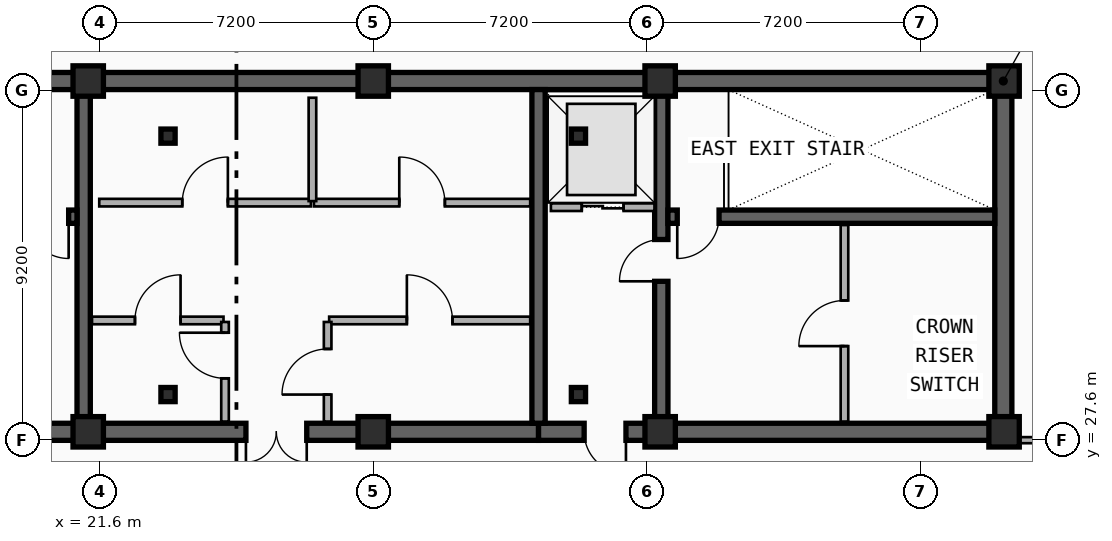
"""IFC4 building model, lengths in metres.
Left out: names, types, materials, properties, quantities, classifications, styles, units other than length and angle.
Written with IfcOpenShell. Run it as: python <this file> out.ifc"""

import sys

from ifc_helpers import new_model, si_unit, direction, frame, frame_2d, origin, origin_2d, place, context, subcontext, project, spatial, rectangle, i_section, extrude, element, fill, save


model = new_model("IFC4")
c1 = context("Model", 3, precision=1e-05, world=origin(), true_north=direction((0.0, 1.0)))
c2 = subcontext(c1, "Body", "Model", "MODEL_VIEW")
j1 = project(units=[si_unit("LENGTHUNIT", "METRE"), si_unit("PLANEANGLEUNIT", "RADIAN")], contexts=[c1])
p1 = place(None, origin())
s1 = spatial("IfcSite", under=j1, at=p1, CompositionType="ELEMENT")
p2 = place(p1, origin())
s2 = spatial("IfcBuilding", under=s1, at=p2, CompositionType="ELEMENT")
p3 = place(p2, frame((0.0, 0.0, 286.6)))
s3 = spatial("IfcBuildingStorey", under=s2, at=p3, CompositionType="ELEMENT", Elevation=286.6)
p4 = place(p3, frame((12.15, 37.05, 0.0), z_axis=(0.0, 0.0, 1.0), x_axis=(1.0, 0.0, 0.0)))
e1 = element("IfcWall", 1, at=p4, inside=s3, PredefinedType="SHEAR", context=c2, shape_type="SweptSolid", body=[
    extrude(rectangle(XDim=33.23, YDim=0.45, at=frame_2d((16.615, 0.0))), origin(), (0.0, 0.0, 1.0), 5.0),
])
p5 = place(p3, frame((21.18, 27.82, 0.0), z_axis=(0.0, 0.0, 1.0), x_axis=(-1.0, 0.0, 0.0)))
e2 = element("IfcWall", 2, at=p5, inside=s3, PredefinedType="SHEAR", context=c2, shape_type="SweptSolid", body=[
    extrude(rectangle(XDim=9.03, YDim=0.45, at=frame_2d((4.515, 0.0))), origin(), (0.0, 0.0, 1.0), 5.0),
])
p6 = place(p5, frame((2.68, 0.0, 0.0)))
e3 = element("IfcOpeningElement", 3, at=p6, cuts=e2, PredefinedType="OPENING", context=c2, shape_type="SweptSolid", body=[
    extrude(rectangle(XDim=1.1, YDim=2.15, at=frame_2d((0.55, 1.075))), frame((0.0, 0.235, 0.0), z_axis=(0.0, -1.0, 0.0), x_axis=(1.0, 0.0, 0.0)), (0.0, 0.0, 1.0), 0.47),
])
p7 = place(p3, frame((33.15, 27.82, 0.0), z_axis=(0.0, 0.0, 1.0), x_axis=(-1.0, 0.0, 0.0)))
e4 = element("IfcWall", 4, at=p7, inside=s3, PredefinedType="SHEAR", context=c2, shape_type="SweptSolid", body=[
    extrude(rectangle(XDim=11.97, YDim=0.45, at=frame_2d((5.985, 0.0))), origin(), (0.0, 0.0, 1.0), 5.0),
])
p8 = place(p7, frame((6.1, 0.0, 0.0)))
e5 = element("IfcOpeningElement", 5, at=p8, cuts=e4, PredefinedType="OPENING", context=c2, shape_type="SweptSolid", body=[
    extrude(rectangle(XDim=1.6, YDim=2.2, at=frame_2d((0.8, 1.1))), frame((0.0, 0.235, 0.0), z_axis=(0.0, -1.0, 0.0), x_axis=(1.0, 0.0, 0.0)), (0.0, 0.0, 1.0), 0.47),
])
p9 = place(p3, frame((45.38, 27.82, 0.0), z_axis=(0.0, 0.0, 1.0), x_axis=(-1.0, 0.0, 0.0)))
e6 = element("IfcWall", 6, at=p9, inside=s3, PredefinedType="SHEAR", context=c2, shape_type="SweptSolid", body=[
    extrude(rectangle(XDim=12.23, YDim=0.45, at=frame_2d((6.115, 0.0))), origin(), (0.0, 0.0, 1.0), 5.0),
])
p10 = place(p9, frame((9.93, 0.0, 0.0)))
e7 = element("IfcOpeningElement", 7, at=p10, cuts=e6, PredefinedType="OPENING", context=c2, shape_type="SweptSolid", body=[
    extrude(rectangle(XDim=1.1, YDim=2.15, at=frame_2d((0.55, 1.075))), frame((0.0, 0.235, 0.0), z_axis=(0.0, -1.0, 0.0), x_axis=(1.0, 0.0, 0.0)), (0.0, 0.0, 1.0), 0.47),
])
p11 = place(p3, frame((45.38, 28.045, 0.0), z_axis=(0.0, 0.0, 1.0), x_axis=(0.0, 1.0, 0.0)))
e8 = element("IfcWall", 8, at=p11, inside=s3, PredefinedType="SHEAR", context=c2, shape_type="SweptSolid", body=[
    extrude(rectangle(XDim=8.78, YDim=0.45, at=frame_2d((4.39, 0.0))), origin(), (0.0, 0.0, 1.0), 5.0),
])
for number, where, z_axis, x_axis in (
    (9, (21.18, 28.045, 0.0), (0.0, 0.0, 1.0), (0.0, 1.0, 0.0)),
    (10, (33.15, 28.045, 0.0), (0.0, 0.0, 1.0), (0.0, 1.0, 0.0)),
):
    element("IfcWall", number, at=place(p3, frame(where, z_axis=z_axis, x_axis=x_axis)), inside=s3, PredefinedType="SHEAR", context=c2, shape_type="SweptSolid", body=[
        extrude(rectangle(XDim=8.78, YDim=0.35, at=frame_2d((4.39, 0.0))), origin(), (0.0, 0.0, 1.0), 5.0),
    ])
p12 = place(p3, frame((36.38, 28.045, 0.0), z_axis=(0.0, 0.0, 1.0), x_axis=(0.0, 1.0, 0.0)))
e11 = element("IfcWall", 11, at=p12, inside=s3, PredefinedType="SHEAR", context=c2, shape_type="SweptSolid", body=[
    extrude(rectangle(XDim=8.78, YDim=0.35, at=frame_2d((4.39, 0.0))), origin(), (0.0, 0.0, 1.0), 5.0),
])
p13 = place(p12, frame((3.735, 0.0, 0.0)))
e12 = element("IfcOpeningElement", 12, at=p13, cuts=e11, PredefinedType="OPENING", context=c2, shape_type="SweptSolid", body=[
    extrude(rectangle(XDim=1.1, YDim=2.15, at=frame_2d((0.55, 1.075))), frame((0.0, 0.185, 0.0), z_axis=(0.0, -1.0, 0.0), x_axis=(1.0, 0.0, 0.0)), (0.0, 0.0, 1.0), 0.37),
])
p14 = place(p3, frame((21.005, 33.48, 0.0), z_axis=(0.0, 0.0, 1.0), x_axis=(-1.0, 0.0, 0.0)))
e13 = element("IfcWall", 13, at=p14, inside=s3, PredefinedType="SHEAR", context=c2, shape_type="SweptSolid", body=[
    extrude(rectangle(XDim=8.63, YDim=0.35, at=frame_2d((4.315, 0.0))), origin(), (0.0, 0.0, 1.0), 5.0),
])
p15 = place(p14, frame((0.22, 0.0, 0.0)))
e14 = element("IfcOpeningElement", 14, at=p15, cuts=e13, PredefinedType="OPENING", context=c2, shape_type="SweptSolid", body=[
    extrude(rectangle(XDim=1.1, YDim=2.15, at=frame_2d((0.55, 1.075))), frame((0.0, 0.185, 0.0), z_axis=(0.0, -1.0, 0.0), x_axis=(1.0, 0.0, 0.0)), (0.0, 0.0, 1.0), 0.37),
])
p16 = place(p3, frame((45.155, 33.48, 0.0), z_axis=(0.0, 0.0, 1.0), x_axis=(-1.0, 0.0, 0.0)))
e15 = element("IfcWall", 15, at=p16, inside=s3, PredefinedType="SHEAR", context=c2, shape_type="SweptSolid", body=[
    extrude(rectangle(XDim=8.6, YDim=0.35, at=frame_2d((4.3, 0.0))), origin(), (0.0, 0.0, 1.0), 5.0),
])
p17 = place(p16, frame((7.255, 0.0, 0.0)))
e16 = element("IfcOpeningElement", 16, at=p17, cuts=e15, PredefinedType="OPENING", context=c2, shape_type="SweptSolid", body=[
    extrude(rectangle(XDim=1.1, YDim=2.15, at=frame_2d((0.55, 1.075))), frame((0.0, 0.185, 0.0), z_axis=(0.0, -1.0, 0.0), x_axis=(1.0, 0.0, 0.0)), (0.0, 0.0, 1.0), 0.37),
])
for number, where, z_axis, x_axis in (
    (17, (23.4, 28.8, 0.0), (0.0, 0.0, 1.0), (1.0, 0.0, 0.0)),
    (18, (34.2, 28.8, 0.0), (0.0, 0.0, 1.0), (1.0, 0.0, 0.0)),
    (19, (34.2, 35.6, 0.0), (0.0, 0.0, 1.0), (1.0, 0.0, 0.0)),
    (20, (23.4, 35.6, 0.0), (0.0, 0.0, 1.0), (1.0, 0.0, 0.0)),
):
    element("IfcColumn", number, at=place(p3, frame(where, z_axis=z_axis, x_axis=x_axis)), inside=s3, PredefinedType="COLUMN", context=c2, shape_type="SweptSolid", body=[
        extrude(i_section(OverallWidth=0.374, OverallDepth=0.372, WebThickness=0.017, FlangeThickness=0.027, FilletRadius=0.015, at=origin_2d()), origin(), (0.0, 0.0, 1.0), 5.0),
    ])
for number, where, z_axis, x_axis in (
    (21, (21.3, 27.82, 0.0), (0.0, 0.0, 1.0), (1.0, 0.0, 0.0)),
    (22, (21.3, 37.05, 0.0), (0.0, 0.0, 1.0), (1.0, 0.0, 0.0)),
    (23, (28.8, 27.82, 0.0), (0.0, 0.0, 1.0), (1.0, 0.0, 0.0)),
    (24, (28.8, 37.05, 0.0), (0.0, 0.0, 1.0), (1.0, 0.0, 0.0)),
    (25, (36.35, 27.82, 0.0), (0.0, 0.0, 1.0), (1.0, 0.0, 0.0)),
    (26, (36.35, 37.05, 0.0), (0.0, 0.0, 1.0), (1.0, 0.0, 0.0)),
    (27, (45.4, 27.82, 0.0), (0.0, 0.0, 1.0), (1.0, 0.0, 0.0)),
    (28, (45.4, 37.05, 0.0), (0.0, 0.0, 1.0), (1.0, 0.0, 0.0)),
):
    element("IfcColumn", number, at=place(p3, frame(where, z_axis=z_axis, x_axis=x_axis)), inside=s3, PredefinedType="COLUMN", context=c2, shape_type="SweptSolid", body=[
        extrude(rectangle(XDim=0.8, YDim=0.8, at=origin_2d()), origin(), (0.0, 0.0, 1.0), 5.0),
    ])
p18 = place(p3, frame((33.475, 33.73, 0.0), z_axis=(0.0, 0.0, 1.0), x_axis=(1.0, 0.0, 0.0)))
e29 = element("IfcWall", 29, at=p18, inside=s3, PredefinedType="PARTITIONING", context=c2, shape_type="SweptSolid", body=[
    extrude(rectangle(XDim=2.725, YDim=0.2, at=frame_2d((1.362, 0.0))), origin(), (0.0, 0.0, 1.0), 3.77),
])
p19 = place(p18, frame((0.812, 0.0, 0.0)))
e30 = element("IfcOpeningElement", 30, at=p19, cuts=e29, PredefinedType="OPENING", context=c2, shape_type="SweptSolid", body=[
    extrude(rectangle(XDim=1.1, YDim=2.15, at=frame_2d((0.55, 1.075))), frame((0.0, 0.11, 0.0), z_axis=(0.0, -1.0, 0.0), x_axis=(1.0, 0.0, 0.0)), (0.0, 0.0, 1.0), 0.22),
])
p20 = place(p3, frame((41.2, 28.09, 0.0), z_axis=(0.0, 0.0, 1.0), x_axis=(0.0, 1.0, 0.0)))
e31 = element("IfcWall", 31, at=p20, inside=s3, PredefinedType="PARTITIONING", context=c2, shape_type="SweptSolid", body=[
    extrude(rectangle(XDim=5.17, YDim=0.2, at=frame_2d((2.585, 0.0))), origin(), (0.0, 0.0, 1.0), 4.7),
])
p21 = place(p20, frame((1.985, 0.0, 0.0)))
e32 = element("IfcOpeningElement", 32, at=p21, cuts=e31, PredefinedType="OPENING", context=c2, shape_type="SweptSolid", body=[
    extrude(rectangle(XDim=1.2, YDim=2.15, at=frame_2d((0.6, 1.075))), frame((0.0, 0.11, 0.0), z_axis=(0.0, -1.0, 0.0), x_axis=(1.0, 0.0, 0.0)), (0.0, 0.0, 1.0), 0.22),
])
p22 = place(p3, frame((21.4, 30.75, 0.0), z_axis=(0.0, 0.0, 1.0), x_axis=(1.0, 0.0, 0.0)))
e33 = element("IfcWall", 33, at=p22, inside=s3, PredefinedType="PARTITIONING", context=c2, shape_type="SweptSolid", body=[
    extrude(rectangle(XDim=3.46, YDim=0.2, at=frame_2d((1.73, 0.0))), origin(), (0.0, 0.0, 1.0), 3.77),
])
p23 = place(p22, frame((1.13, 0.0, 0.0)))
e34 = element("IfcOpeningElement", 34, at=p23, cuts=e33, PredefinedType="OPENING", context=c2, shape_type="SweptSolid", body=[
    extrude(rectangle(XDim=1.2, YDim=2.15, at=frame_2d((0.6, 1.075))), frame((0.0, 0.11, 0.0), z_axis=(0.0, -1.0, 0.0), x_axis=(1.0, 0.0, 0.0)), (0.0, 0.0, 1.0), 0.22),
])
p24 = place(p3, frame((27.64, 30.75, 0.0), z_axis=(0.0, 0.0, 1.0), x_axis=(1.0, 0.0, 0.0)))
e35 = element("IfcWall", 35, at=p24, inside=s3, PredefinedType="PARTITIONING", context=c2, shape_type="SweptSolid", body=[
    extrude(rectangle(XDim=5.29, YDim=0.2, at=frame_2d((2.645, 0.0))), origin(), (0.0, 0.0, 1.0), 3.77),
])
p25 = place(p24, frame((2.045, 0.0, 0.0)))
e36 = element("IfcOpeningElement", 36, at=p25, cuts=e35, PredefinedType="OPENING", context=c2, shape_type="SweptSolid", body=[
    extrude(rectangle(XDim=1.2, YDim=2.15, at=frame_2d((0.6, 1.075))), frame((0.0, 0.11, 0.0), z_axis=(0.0, -1.0, 0.0), x_axis=(1.0, 0.0, 0.0)), (0.0, 0.0, 1.0), 0.22),
])
p26 = place(p3, frame((21.59, 33.85, 0.0), z_axis=(0.0, 0.0, 1.0), x_axis=(1.0, 0.0, 0.0)))
e37 = element("IfcWall", 37, at=p26, inside=s3, PredefinedType="PARTITIONING", context=c2, shape_type="SweptSolid", body=[
    extrude(rectangle(XDim=5.57, YDim=0.2, at=frame_2d((2.785, 0.0))), origin(), (0.0, 0.0, 1.0), 3.77),
])
p27 = place(p26, frame((2.185, 0.0, 0.0)))
e38 = element("IfcOpeningElement", 38, at=p27, cuts=e37, PredefinedType="OPENING", context=c2, shape_type="SweptSolid", body=[
    extrude(rectangle(XDim=1.2, YDim=2.15, at=frame_2d((0.6, 1.075))), frame((0.0, 0.11, 0.0), z_axis=(0.0, -1.0, 0.0), x_axis=(1.0, 0.0, 0.0)), (0.0, 0.0, 1.0), 0.22),
])
p28 = place(p3, frame((27.24, 33.85, 0.0), z_axis=(0.0, 0.0, 1.0), x_axis=(1.0, 0.0, 0.0)))
e39 = element("IfcWall", 39, at=p28, inside=s3, PredefinedType="PARTITIONING", context=c2, shape_type="SweptSolid", body=[
    extrude(rectangle(XDim=5.69, YDim=0.2, at=frame_2d((2.845, 0.0))), origin(), (0.0, 0.0, 1.0), 3.77),
])
p29 = place(p28, frame((2.245, 0.0, 0.0)))
e40 = element("IfcOpeningElement", 40, at=p29, cuts=e39, PredefinedType="OPENING", context=c2, shape_type="SweptSolid", body=[
    extrude(rectangle(XDim=1.2, YDim=2.15, at=frame_2d((0.6, 1.075))), frame((0.0, 0.11, 0.0), z_axis=(0.0, -1.0, 0.0), x_axis=(1.0, 0.0, 0.0)), (0.0, 0.0, 1.0), 0.22),
])
p30 = place(p3, frame((24.9, 28.09, 0.0), z_axis=(0.0, 0.0, 1.0), x_axis=(0.0, 1.0, 0.0)))
e41 = element("IfcWall", 41, at=p30, inside=s3, PredefinedType="PARTITIONING", context=c2, shape_type="SweptSolid", body=[
    extrude(rectangle(XDim=2.62, YDim=0.2, at=frame_2d((1.31, 0.0))), origin(), (0.0, 0.0, 1.0), 4.7),
])
p31 = place(p30, frame((1.137, 0.0, 0.0)))
e42 = element("IfcOpeningElement", 42, at=p31, cuts=e41, PredefinedType="OPENING", context=c2, shape_type="SweptSolid", body=[
    extrude(rectangle(XDim=1.2, YDim=2.15, at=frame_2d((0.6, 1.075))), frame((0.0, 0.11, 0.0), z_axis=(0.0, -1.0, 0.0), x_axis=(1.0, 0.0, 0.0)), (0.0, 0.0, 1.0), 0.22),
])
p32 = place(p3, frame((27.6, 28.09, 0.0), z_axis=(0.0, 0.0, 1.0), x_axis=(0.0, 1.0, 0.0)))
e43 = element("IfcWall", 43, at=p32, inside=s3, PredefinedType="PARTITIONING", context=c2, shape_type="SweptSolid", body=[
    extrude(rectangle(XDim=2.62, YDim=0.2, at=frame_2d((1.31, 0.0))), origin(), (0.0, 0.0, 1.0), 4.7),
])
p33 = place(p32, frame((0.71, 0.0, 0.0)))
e44 = element("IfcOpeningElement", 44, at=p33, cuts=e43, PredefinedType="OPENING", context=c2, shape_type="SweptSolid", body=[
    extrude(rectangle(XDim=1.2, YDim=2.15, at=frame_2d((0.6, 1.075))), frame((0.0, 0.11, 0.0), z_axis=(0.0, -1.0, 0.0), x_axis=(1.0, 0.0, 0.0)), (0.0, 0.0, 1.0), 0.22),
])
p34 = place(p3, frame((27.2, 33.89, 0.0), z_axis=(0.0, 0.0, 1.0), x_axis=(0.0, 1.0, 0.0)))
e45 = element("IfcWall", 45, at=p34, inside=s3, PredefinedType="PARTITIONING", context=c2, shape_type="SweptSolid", body=[
    extrude(rectangle(XDim=2.72, YDim=0.2, at=frame_2d((1.36, 0.0))), origin(), (0.0, 0.0, 1.0), 4.7),
])
p35 = place(p3, frame((45.41, 27.6, 0.0), z_axis=(0.0, 0.0, 1.0), x_axis=(1.0, 0.0, 0.0)))
e46 = element("IfcWall", 46, at=p35, inside=s3, PredefinedType="PARTITIONING", context=c2, shape_type="SweptSolid", body=[
    extrude(rectangle(XDim=1.7, YDim=0.16, at=frame_2d((0.85, 0.0))), origin(), (0.0, 0.0, 1.0), 3.77),
])
p36 = place(p19, origin())
e47 = element("IfcDoor", 47, at=p36, inside=s3, OperationType="DOUBLE_DOOR_SLIDING", PredefinedType="DOOR", context=c2, shape_type="SweptSolid", body=[
    extrude(rectangle(XDim=1.1, YDim=2.15, at=frame_2d((0.55, 1.075))), frame((0.0, 0.025, 0.0), z_axis=(0.0, -1.0, 0.0), x_axis=(1.0, 0.0, 0.0)), (0.0, 0.0, 1.0), 0.05),
])
fill(e30, e47)
p37 = place(p15, origin())
e48 = element("IfcDoor", 48, at=p37, inside=s3, OperationType="SINGLE_SWING_LEFT", PredefinedType="DOOR", context=c2, shape_type="SweptSolid", body=[
    extrude(rectangle(XDim=1.1, YDim=2.15, at=frame_2d((0.55, 1.075))), frame((0.0, 0.025, 0.0), z_axis=(0.0, -1.0, 0.0), x_axis=(1.0, 0.0, 0.0)), (0.0, 0.0, 1.0), 0.05),
])
fill(e14, e48)
p38 = place(p17, origin())
e49 = element("IfcDoor", 49, at=p38, inside=s3, OperationType="SINGLE_SWING_RIGHT", PredefinedType="DOOR", context=c2, shape_type="SweptSolid", body=[
    extrude(rectangle(XDim=1.1, YDim=2.15, at=frame_2d((0.55, 1.075))), frame((0.0, 0.025, 0.0), z_axis=(0.0, -1.0, 0.0), x_axis=(1.0, 0.0, 0.0)), (0.0, 0.0, 1.0), 0.05),
])
fill(e16, e49)
p39 = place(p13, origin())
e50 = element("IfcDoor", 50, at=p39, inside=s3, OperationType="SINGLE_SWING_LEFT", PredefinedType="DOOR", context=c2, shape_type="SweptSolid", body=[
    extrude(rectangle(XDim=1.1, YDim=2.15, at=frame_2d((0.55, 1.075))), frame((0.0, 0.025, 0.0), z_axis=(0.0, -1.0, 0.0), x_axis=(1.0, 0.0, 0.0)), (0.0, 0.0, 1.0), 0.05),
])
fill(e12, e50)
p40 = place(p10, origin())
e51 = element("IfcDoor", 51, at=p40, inside=s3, OperationType="SINGLE_SWING_LEFT", PredefinedType="DOOR", context=c2, shape_type="SweptSolid", body=[
    extrude(rectangle(XDim=1.1, YDim=2.15, at=frame_2d((0.55, 1.075))), frame((0.0, 0.025, 0.0), z_axis=(0.0, -1.0, 0.0), x_axis=(1.0, 0.0, 0.0)), (0.0, 0.0, 1.0), 0.05),
])
fill(e7, e51)
p41 = place(p8, origin())
e52 = element("IfcDoor", 52, at=p41, inside=s3, OperationType="SINGLE_SWING_LEFT", PredefinedType="DOOR", context=c2, shape_type="SweptSolid", body=[
    extrude(rectangle(XDim=1.6, YDim=2.2, at=frame_2d((0.8, 1.1))), frame((0.0, 0.025, 0.0), z_axis=(0.0, -1.0, 0.0), x_axis=(1.0, 0.0, 0.0)), (0.0, 0.0, 1.0), 0.05),
])
fill(e5, e52)
p42 = place(p21, origin())
e53 = element("IfcDoor", 53, at=p42, inside=s3, OperationType="SINGLE_SWING_LEFT", PredefinedType="DOOR", context=c2, shape_type="SweptSolid", body=[
    extrude(rectangle(XDim=1.2, YDim=2.15, at=frame_2d((0.6, 1.075))), frame((0.0, 0.025, 0.0), z_axis=(0.0, -1.0, 0.0), x_axis=(1.0, 0.0, 0.0)), (0.0, 0.0, 1.0), 0.05),
])
fill(e32, e53)
p43 = place(p23, origin())
e54 = element("IfcDoor", 54, at=p43, inside=s3, OperationType="SINGLE_SWING_RIGHT", PredefinedType="DOOR", context=c2, shape_type="SweptSolid", body=[
    extrude(rectangle(XDim=1.2, YDim=2.15, at=frame_2d((0.6, 1.075))), frame((0.0, 0.025, 0.0), z_axis=(0.0, -1.0, 0.0), x_axis=(1.0, 0.0, 0.0)), (0.0, 0.0, 1.0), 0.05),
])
fill(e34, e54)
p44 = place(p25, origin())
e55 = element("IfcDoor", 55, at=p44, inside=s3, OperationType="SINGLE_SWING_LEFT", PredefinedType="DOOR", context=c2, shape_type="SweptSolid", body=[
    extrude(rectangle(XDim=1.2, YDim=2.15, at=frame_2d((0.6, 1.075))), frame((0.0, 0.025, 0.0), z_axis=(0.0, -1.0, 0.0), x_axis=(1.0, 0.0, 0.0)), (0.0, 0.0, 1.0), 0.05),
])
fill(e36, e55)
p45 = place(p27, origin())
e56 = element("IfcDoor", 56, at=p45, inside=s3, OperationType="SINGLE_SWING_RIGHT", PredefinedType="DOOR", context=c2, shape_type="SweptSolid", body=[
    extrude(rectangle(XDim=1.2, YDim=2.15, at=frame_2d((0.6, 1.075))), frame((0.0, 0.025, 0.0), z_axis=(0.0, -1.0, 0.0), x_axis=(1.0, 0.0, 0.0)), (0.0, 0.0, 1.0), 0.05),
])
fill(e38, e56)
p46 = place(p29, origin())
e57 = element("IfcDoor", 57, at=p46, inside=s3, OperationType="SINGLE_SWING_LEFT", PredefinedType="DOOR", context=c2, shape_type="SweptSolid", body=[
    extrude(rectangle(XDim=1.2, YDim=2.15, at=frame_2d((0.6, 1.075))), frame((0.0, 0.025, 0.0), z_axis=(0.0, -1.0, 0.0), x_axis=(1.0, 0.0, 0.0)), (0.0, 0.0, 1.0), 0.05),
])
fill(e40, e57)
p47 = place(p31, origin())
e58 = element("IfcDoor", 58, at=p47, inside=s3, OperationType="SINGLE_SWING_RIGHT", PredefinedType="DOOR", context=c2, shape_type="SweptSolid", body=[
    extrude(rectangle(XDim=1.2, YDim=2.15, at=frame_2d((0.6, 1.075))), frame((0.0, 0.025, 0.0), z_axis=(0.0, -1.0, 0.0), x_axis=(1.0, 0.0, 0.0)), (0.0, 0.0, 1.0), 0.05),
])
fill(e42, e58)
p48 = place(p33, origin())
e59 = element("IfcDoor", 59, at=p48, inside=s3, OperationType="SINGLE_SWING_LEFT", PredefinedType="DOOR", context=c2, shape_type="SweptSolid", body=[
    extrude(rectangle(XDim=1.2, YDim=2.15, at=frame_2d((0.6, 1.075))), frame((0.0, 0.025, 0.0), z_axis=(0.0, -1.0, 0.0), x_axis=(1.0, 0.0, 0.0)), (0.0, 0.0, 1.0), 0.05),
])
fill(e44, e59)
save(model, sys.argv[1])
